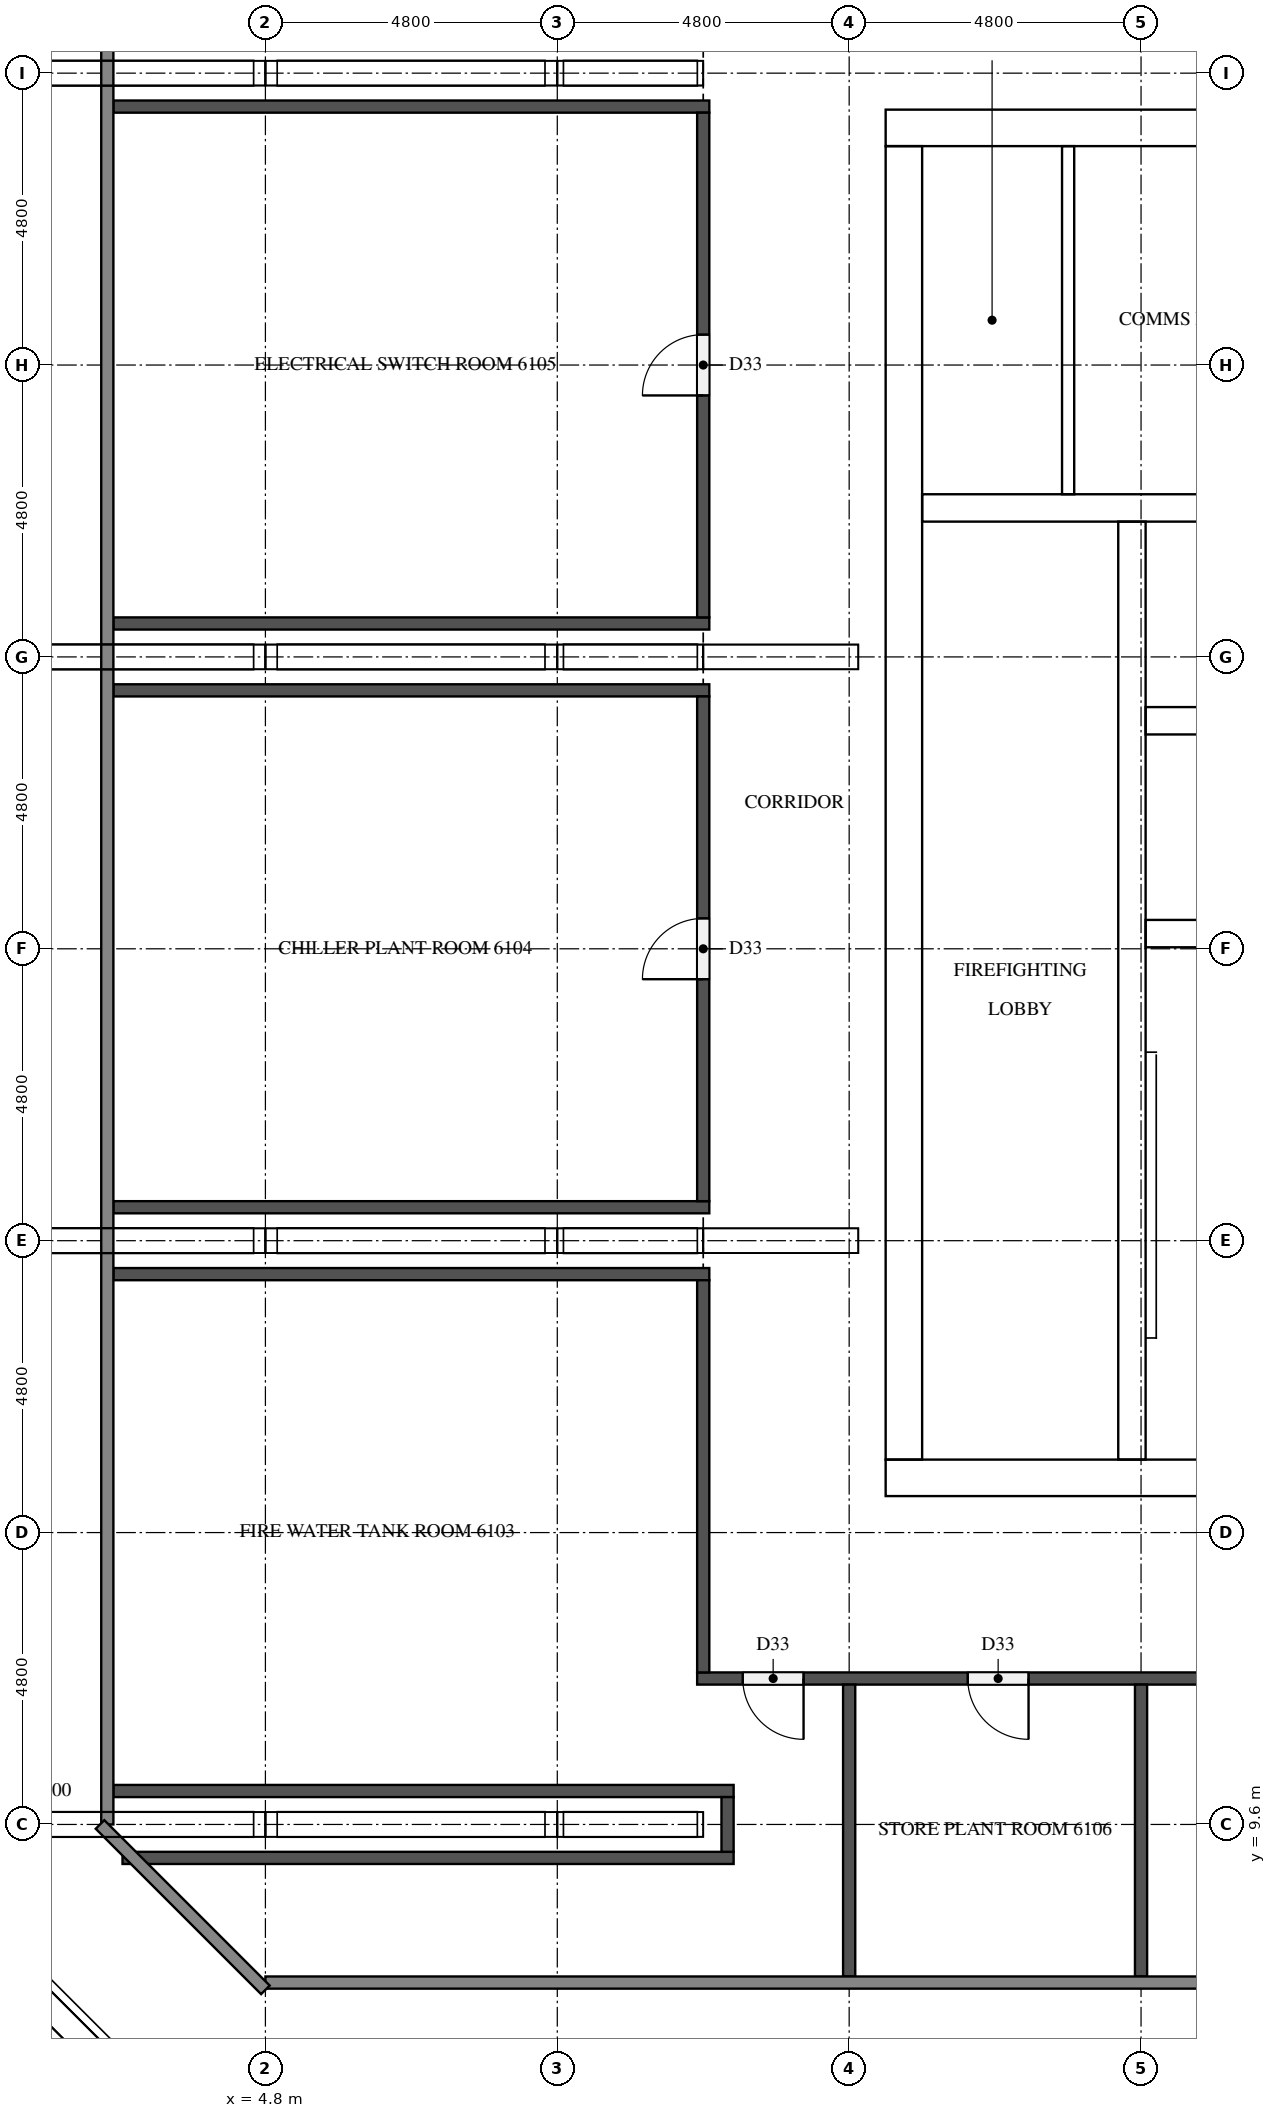
"""IFC4 building model, lengths in metres.
Left out: names, types, materials, properties, quantities, classifications, styles, units other than length and angle.
Written with IfcOpenShell. Run it as: python <this file> out.ifc"""

import sys

from ifc_helpers import new_model, si_unit, direction, frame, frame_2d, origin, place, context, subcontext, project, spatial, rectangle, extrude, element, fill, save


model = new_model("IFC4")
c1 = context("Model", 3, precision=1e-05, world=origin(), true_north=direction((0.0, 1.0)))
c2 = subcontext(c1, "Body", "Model", "MODEL_VIEW")
j1 = project(units=[si_unit("LENGTHUNIT", "METRE"), si_unit("PLANEANGLEUNIT", "RADIAN")], contexts=[c1])
p1 = place(None, origin())
s1 = spatial("IfcSite", under=j1, at=p1, CompositionType="ELEMENT")
p2 = place(p1, origin())
s2 = spatial("IfcBuilding", under=s1, at=p2, CompositionType="ELEMENT")
p3 = place(p2, frame((0.0, 0.0, 233.3)))
s3 = spatial("IfcBuildingStorey", under=s2, at=p3, CompositionType="ELEMENT", Elevation=233.3)
p4 = place(p3, frame((15.0, 15.3, 0.0), z_axis=(0.0, 0.0, 1.0), x_axis=(1.0, 0.0, 0.0)))
e1 = element("IfcWall", 1, at=p4, inside=s3, PredefinedType="SHEAR", context=c2, shape_type="SweptSolid", body=[
    extrude(rectangle(XDim=32.4, YDim=0.6, at=frame_2d((16.2, 0.0))), origin(), (0.0, 0.0, 1.0), 5.1),
])
p5 = place(p4, frame((15.3, 0.0, 0.0)))
e2 = element("IfcOpeningElement", 2, at=p5, cuts=e1, PredefinedType="OPENING", context=c2, shape_type="SweptSolid", body=[
    extrude(rectangle(XDim=1.8, YDim=2.1, at=frame_2d((0.9, 1.05))), frame((0.0, 0.31, 0.0), z_axis=(0.0, -1.0, 0.0), x_axis=(1.0, 0.0, 0.0)), (0.0, 0.0, 1.0), 0.62),
])
p6 = place(p3, frame((15.0, 37.5, 0.0), z_axis=(0.0, 0.0, 1.0), x_axis=(1.0, 0.0, 0.0)))
e3 = element("IfcWall", 3, at=p6, inside=s3, PredefinedType="SHEAR", context=c2, shape_type="SweptSolid", body=[
    extrude(rectangle(XDim=32.4, YDim=0.6, at=frame_2d((16.2, 0.0))), origin(), (0.0, 0.0, 1.0), 5.1),
])
p7 = place(p6, frame((15.3, 0.0, 0.0)))
e4 = element("IfcOpeningElement", 4, at=p7, cuts=e3, PredefinedType="OPENING", context=c2, shape_type="SweptSolid", body=[
    extrude(rectangle(XDim=1.8, YDim=2.1, at=frame_2d((0.9, 1.05))), frame((0.0, 0.31, 0.0), z_axis=(0.0, -1.0, 0.0), x_axis=(1.0, 0.0, 0.0)), (0.0, 0.0, 1.0), 0.62),
])
p8 = place(p6, frame((1.25, 0.0, 0.0)))
e5 = element("IfcOpeningElement", 5, at=p8, cuts=e3, PredefinedType="OPENING", context=c2, shape_type="SweptSolid", body=[
    extrude(rectangle(XDim=1.0, YDim=2.1, at=frame_2d((0.5, 1.05))), frame((0.0, 0.31, 0.0), z_axis=(0.0, -1.0, 0.0), x_axis=(1.0, 0.0, 0.0)), (0.0, 0.0, 1.0), 0.62),
])
p9 = place(p6, frame((4.988, 0.0, 0.0)))
e6 = element("IfcOpeningElement", 6, at=p9, cuts=e3, PredefinedType="OPENING", context=c2, shape_type="SweptSolid", body=[
    extrude(rectangle(XDim=1.0, YDim=2.1, at=frame_2d((0.5, 1.05))), frame((0.0, 0.31, 0.0), z_axis=(0.0, -1.0, 0.0), x_axis=(1.0, 0.0, 0.0)), (0.0, 0.0, 1.0), 0.62),
])
p10 = place(p3, frame((15.3, 15.6, 0.0), z_axis=(0.0, 0.0, 1.0), x_axis=(0.0, 1.0, 0.0)))
e7 = element("IfcWall", 7, at=p10, inside=s3, PredefinedType="SHEAR", context=c2, shape_type="SweptSolid", body=[
    extrude(rectangle(XDim=21.6, YDim=0.6, at=frame_2d((10.8, 0.0))), origin(), (0.0, 0.0, 1.0), 5.1),
])
p11 = place(p10, frame((5.16, 0.0, 0.0)))
e8 = element("IfcOpeningElement", 8, at=p11, cuts=e7, PredefinedType="OPENING", context=c2, shape_type="SweptSolid", body=[
    extrude(rectangle(XDim=1.2, YDim=2.1, at=frame_2d((0.6, 1.05))), frame((0.0, 0.31, 0.0), z_axis=(0.0, -1.0, 0.0), x_axis=(1.0, 0.0, 0.0)), (0.0, 0.0, 1.0), 0.62),
])
p12 = place(p3, frame((19.05, 15.6, 0.0), z_axis=(0.0, 0.0, 1.0), x_axis=(0.0, 1.0, 0.0)))
e9 = element("IfcWall", 9, at=p12, inside=s3, PredefinedType="SHEAR", context=c2, shape_type="SweptSolid", body=[
    extrude(rectangle(XDim=15.425, YDim=0.45, at=frame_2d((7.712, 0.0))), origin(), (0.0, 0.0, 1.0), 5.1),
])
p13 = place(p12, frame((9.85, 0.0, 0.0)))
e10 = element("IfcOpeningElement", 10, at=p13, cuts=e9, PredefinedType="OPENING", context=c2, shape_type="SweptSolid", body=[
    extrude(rectangle(XDim=1.1, YDim=2.1, at=frame_2d((0.55, 1.05))), frame((0.0, 0.235, 0.0), z_axis=(0.0, -1.0, 0.0), x_axis=(1.0, 0.0, 0.0)), (0.0, 0.0, 1.0), 0.47),
])
p14 = place(p12, frame((13.35, 0.0, 0.0)))
e11 = element("IfcOpeningElement", 11, at=p14, cuts=e9, PredefinedType="OPENING", context=c2, shape_type="SweptSolid", body=[
    extrude(rectangle(XDim=1.1, YDim=2.1, at=frame_2d((0.55, 1.05))), frame((0.0, 0.235, 0.0), z_axis=(0.0, -1.0, 0.0), x_axis=(1.0, 0.0, 0.0)), (0.0, 0.0, 1.0), 0.47),
])
p15 = place(p12, frame((0.6, 0.0, 0.0)))
e12 = element("IfcOpeningElement", 12, at=p15, cuts=e9, PredefinedType="OPENING", context=c2, shape_type="SweptSolid", body=[
    extrude(rectangle(XDim=1.2, YDim=2.1, at=frame_2d((0.6, 1.05))), frame((0.0, 0.235, 0.0), z_axis=(0.0, -1.0, 0.0), x_axis=(1.0, 0.0, 0.0)), (0.0, 0.0, 1.0), 0.47),
])
for number, where, z_axis, x_axis in (
    (13, (19.275, 24.25, 0.0), (0.0, 0.0, 1.0), (1.0, 0.0, 0.0)),
    (14, (19.275, 27.75, 0.0), (0.0, 0.0, 1.0), (1.0, 0.0, 0.0)),
):
    element("IfcWall", number, at=place(p3, frame(where, z_axis=z_axis, x_axis=x_axis)), inside=s3, PredefinedType="SHEAR", context=c2, shape_type="SweptSolid", body=[
        extrude(rectangle(XDim=3.6, YDim=0.45, at=frame_2d((1.8, 0.0))), origin(), (0.0, 0.0, 1.0), 5.1),
    ])
p16 = place(p3, frame((15.6, 31.25, 0.0), z_axis=(0.0, 0.0, 1.0), x_axis=(1.0, 0.0, 0.0)))
e15 = element("IfcWall", 15, at=p16, inside=s3, PredefinedType="SHEAR", context=c2, shape_type="SweptSolid", body=[
    extrude(rectangle(XDim=7.275, YDim=0.45, at=frame_2d((3.637, 0.0))), origin(), (0.0, 0.0, 1.0), 5.1),
])
p17 = place(p3, frame((18.001, 31.475, 0.0), z_axis=(0.0, 0.0, 1.0), x_axis=(0.0, 1.0, 0.0)))
e16 = element("IfcWall", 16, at=p17, inside=s3, PredefinedType="PARTITIONING", context=c2, shape_type="SweptSolid", body=[
    extrude(rectangle(XDim=5.725, YDim=0.2, at=frame_2d((2.862, 0.0))), origin(), (0.0, 0.0, 1.0), 5.1),
])
p18 = place(p3, frame((2.45, 9.05, 0.0), z_axis=(0.0, 0.0, 1.0), x_axis=(1.0, 0.0, 0.0)))
e17 = element("IfcWall", 17, at=p18, inside=s3, PredefinedType="PARTITIONING", context=c2, shape_type="SweptSolid", body=[
    extrude(rectangle(XDim=10.05, YDim=0.2, at=frame_2d((5.025, 0.0))), origin(), (0.0, 0.0, 1.0), 5.1),
])
p19 = place(p3, frame((2.3, 10.15, 0.0), z_axis=(0.0, 0.0, 1.0), x_axis=(1.0, 0.0, 0.0)))
e18 = element("IfcWall", 18, at=p19, inside=s3, PredefinedType="PARTITIONING", context=c2, shape_type="SweptSolid", body=[
    extrude(rectangle(XDim=10.2, YDim=0.2, at=frame_2d((5.1, 0.0))), origin(), (0.0, 0.0, 1.0), 5.1),
])
p20 = place(p3, frame((38.4, 12.0, 0.0), z_axis=(0.0, 0.0, 1.0), x_axis=(-1.0, 0.0, 0.0)))
e19 = element("IfcWall", 19, at=p20, inside=s3, PredefinedType="PARTITIONING", context=c2, shape_type="SweptSolid", body=[
    extrude(rectangle(XDim=26.5, YDim=0.2, at=frame_2d((13.25, 0.0))), origin(), (0.0, 0.0, 1.0), 5.1),
])
p21 = place(p20, frame((24.75, 0.0, 0.0)))
e20 = element("IfcOpeningElement", 20, at=p21, cuts=e19, PredefinedType="OPENING", context=c2, shape_type="SweptSolid", body=[
    extrude(rectangle(XDim=1.0, YDim=2.1, at=frame_2d((0.5, 1.05))), frame((0.0, 0.11, 0.0), z_axis=(0.0, -1.0, 0.0), x_axis=(1.0, 0.0, 0.0)), (0.0, 0.0, 1.0), 0.22),
])
p22 = place(p20, frame((21.05, 0.0, 0.0)))
e21 = element("IfcOpeningElement", 21, at=p22, cuts=e19, PredefinedType="OPENING", context=c2, shape_type="SweptSolid", body=[
    extrude(rectangle(XDim=1.0, YDim=2.1, at=frame_2d((0.5, 1.05))), frame((0.0, 0.11, 0.0), z_axis=(0.0, -1.0, 0.0), x_axis=(1.0, 0.0, 0.0)), (0.0, 0.0, 1.0), 0.22),
])
p23 = place(p20, frame((13.95, 0.0, 0.0)))
e22 = element("IfcOpeningElement", 22, at=p23, cuts=e19, PredefinedType="OPENING", context=c2, shape_type="SweptSolid", body=[
    extrude(rectangle(XDim=1.0, YDim=2.1, at=frame_2d((0.5, 1.05))), frame((0.0, 0.11, 0.0), z_axis=(0.0, -1.0, 0.0), x_axis=(1.0, 0.0, 0.0)), (0.0, 0.0, 1.0), 0.22),
])
p24 = place(p20, frame((4.25, 0.0, 0.0)))
e23 = element("IfcOpeningElement", 23, at=p24, cuts=e19, PredefinedType="OPENING", context=c2, shape_type="SweptSolid", body=[
    extrude(rectangle(XDim=1.0, YDim=2.1, at=frame_2d((0.5, 1.05))), frame((0.0, 0.11, 0.0), z_axis=(0.0, -1.0, 0.0), x_axis=(1.0, 0.0, 0.0)), (0.0, 0.0, 1.0), 0.22),
])
for number, where, z_axis, x_axis in (
    (24, (2.3, 18.65, 0.0), (0.0, 0.0, 1.0), (1.0, 0.0, 0.0)),
    (25, (2.3, 19.75, 0.0), (0.0, 0.0, 1.0), (1.0, 0.0, 0.0)),
    (26, (2.3, 28.25, 0.0), (0.0, 0.0, 1.0), (1.0, 0.0, 0.0)),
    (27, (2.3, 29.35, 0.0), (0.0, 0.0, 1.0), (1.0, 0.0, 0.0)),
    (28, (2.3, 37.85, 0.0), (0.0, 0.0, 1.0), (1.0, 0.0, 0.0)),
):
    element("IfcWall", number, at=place(p3, frame(where, z_axis=z_axis, x_axis=x_axis)), inside=s3, PredefinedType="PARTITIONING", context=c2, shape_type="SweptSolid", body=[
        extrude(rectangle(XDim=9.8, YDim=0.2, at=frame_2d((4.9, 0.0))), origin(), (0.0, 0.0, 1.0), 5.1),
    ])
p25 = place(p3, frame((12.0, 12.1, 0.0), z_axis=(0.0, 0.0, 1.0), x_axis=(0.0, 1.0, 0.0)))
e29 = element("IfcWall", 29, at=p25, inside=s3, PredefinedType="PARTITIONING", context=c2, shape_type="SweptSolid", body=[
    extrude(rectangle(XDim=6.45, YDim=0.2, at=frame_2d((3.225, 0.0))), origin(), (0.0, 0.0, 1.0), 5.1),
])
p26 = place(p3, frame((12.0, 19.85, 0.0), z_axis=(0.0, 0.0, 1.0), x_axis=(0.0, 1.0, 0.0)))
e30 = element("IfcWall", 30, at=p26, inside=s3, PredefinedType="PARTITIONING", context=c2, shape_type="SweptSolid", body=[
    extrude(rectangle(XDim=8.3, YDim=0.2, at=frame_2d((4.15, 0.0))), origin(), (0.0, 0.0, 1.0), 5.1),
])
p27 = place(p26, frame((3.65, 0.0, 0.0)))
e31 = element("IfcOpeningElement", 31, at=p27, cuts=e30, PredefinedType="OPENING", context=c2, shape_type="SweptSolid", body=[
    extrude(rectangle(XDim=1.0, YDim=2.1, at=frame_2d((0.5, 1.05))), frame((0.0, 0.11, 0.0), z_axis=(0.0, -1.0, 0.0), x_axis=(1.0, 0.0, 0.0)), (0.0, 0.0, 1.0), 0.22),
])
p28 = place(p3, frame((12.0, 29.45, 0.0), z_axis=(0.0, 0.0, 1.0), x_axis=(0.0, 1.0, 0.0)))
e32 = element("IfcWall", 32, at=p28, inside=s3, PredefinedType="PARTITIONING", context=c2, shape_type="SweptSolid", body=[
    extrude(rectangle(XDim=8.3, YDim=0.2, at=frame_2d((4.15, 0.0))), origin(), (0.0, 0.0, 1.0), 5.1),
])
p29 = place(p28, frame((3.65, 0.0, 0.0)))
e33 = element("IfcOpeningElement", 33, at=p29, cuts=e32, PredefinedType="OPENING", context=c2, shape_type="SweptSolid", body=[
    extrude(rectangle(XDim=1.0, YDim=2.1, at=frame_2d((0.5, 1.05))), frame((0.0, 0.11, 0.0), z_axis=(0.0, -1.0, 0.0), x_axis=(1.0, 0.0, 0.0)), (0.0, 0.0, 1.0), 0.22),
])
p30 = place(p3, frame((12.4, 9.15, 0.0), z_axis=(0.0, 0.0, 1.0), x_axis=(0.0, 1.0, 0.0)))
e34 = element("IfcWall", 34, at=p30, inside=s3, PredefinedType="PARTITIONING", context=c2, shape_type="SweptSolid", body=[
    extrude(rectangle(XDim=0.9, YDim=0.2, at=frame_2d((0.45, 0.0))), origin(), (0.0, 0.0, 1.0), 5.1),
])
for number, where, z_axis, x_axis in (
    (35, (14.4, 7.1, 0.0), (0.0, 0.0, 1.0), (0.0, 1.0, 0.0)),
    (36, (19.2, 7.1, 0.0), (0.0, 0.0, 1.0), (0.0, 1.0, 0.0)),
):
    element("IfcWall", number, at=place(p3, frame(where, z_axis=z_axis, x_axis=x_axis)), inside=s3, PredefinedType="PARTITIONING", context=c2, shape_type="SweptSolid", body=[
        extrude(rectangle(XDim=4.8, YDim=0.2, at=frame_2d((2.4, 0.0))), origin(), (0.0, 0.0, 1.0), 5.1),
    ])
p31 = place(p13, origin())
e37 = element("IfcDoor", 37, at=p31, inside=s3, OperationType="DOUBLE_DOOR_SLIDING", PredefinedType="DOOR", context=c2, shape_type="SweptSolid", body=[
    extrude(rectangle(XDim=1.1, YDim=2.1, at=frame_2d((0.55, 1.05))), frame((0.0, 0.025, 0.0), z_axis=(0.0, -1.0, 0.0), x_axis=(1.0, 0.0, 0.0)), (0.0, 0.0, 1.0), 0.05),
])
fill(e10, e37)
p32 = place(p14, origin())
e38 = element("IfcDoor", 38, at=p32, inside=s3, OperationType="DOUBLE_DOOR_SLIDING", PredefinedType="DOOR", context=c2, shape_type="SweptSolid", body=[
    extrude(rectangle(XDim=1.1, YDim=2.1, at=frame_2d((0.55, 1.05))), frame((0.0, 0.025, 0.0), z_axis=(0.0, -1.0, 0.0), x_axis=(1.0, 0.0, 0.0)), (0.0, 0.0, 1.0), 0.05),
])
fill(e11, e38)
p33 = place(p15, frame((1.2, 0.0, 0.0), z_axis=(0.0, 0.0, 1.0), x_axis=(-1.0, 0.0, 0.0)))
e39 = element("IfcDoor", 39, at=p33, inside=s3, OperationType="SINGLE_SWING_LEFT", PredefinedType="DOOR", context=c2, shape_type="SweptSolid", body=[
    extrude(rectangle(XDim=1.2, YDim=2.1, at=frame_2d((0.6, 1.05))), frame((0.0, 0.025, 0.0), z_axis=(0.0, -1.0, 0.0), x_axis=(1.0, 0.0, 0.0)), (0.0, 0.0, 1.0), 0.05),
])
fill(e12, e39)
p34 = place(p11, frame((1.2, 0.0, 0.0), z_axis=(0.0, 0.0, 1.0), x_axis=(-1.0, 0.0, 0.0)))
e40 = element("IfcDoor", 40, at=p34, inside=s3, OperationType="SINGLE_SWING_RIGHT", PredefinedType="DOOR", context=c2, shape_type="SweptSolid", body=[
    extrude(rectangle(XDim=1.2, YDim=2.1, at=frame_2d((0.6, 1.05))), frame((0.0, 0.025, 0.0), z_axis=(0.0, -1.0, 0.0), x_axis=(1.0, 0.0, 0.0)), (0.0, 0.0, 1.0), 0.05),
])
fill(e8, e40)
p35 = place(p8, origin())
e41 = element("IfcDoor", 41, at=p35, inside=s3, OperationType="SINGLE_SWING_RIGHT", PredefinedType="DOOR", context=c2, shape_type="SweptSolid", body=[
    extrude(rectangle(XDim=1.0, YDim=2.1, at=frame_2d((0.5, 1.05))), frame((0.0, 0.025, 0.0), z_axis=(0.0, -1.0, 0.0), x_axis=(1.0, 0.0, 0.0)), (0.0, 0.0, 1.0), 0.05),
])
fill(e5, e41)
p36 = place(p9, origin())
e42 = element("IfcDoor", 42, at=p36, inside=s3, OperationType="SINGLE_SWING_LEFT", PredefinedType="DOOR", context=c2, shape_type="SweptSolid", body=[
    extrude(rectangle(XDim=1.0, YDim=2.1, at=frame_2d((0.5, 1.05))), frame((0.0, 0.025, 0.0), z_axis=(0.0, -1.0, 0.0), x_axis=(1.0, 0.0, 0.0)), (0.0, 0.0, 1.0), 0.05),
])
fill(e6, e42)
p37 = place(p21, origin())
e43 = element("IfcDoor", 43, at=p37, inside=s3, OperationType="SINGLE_SWING_LEFT", PredefinedType="DOOR", context=c2, shape_type="SweptSolid", body=[
    extrude(rectangle(XDim=1.0, YDim=2.1, at=frame_2d((0.5, 1.05))), frame((0.0, 0.025, 0.0), z_axis=(0.0, -1.0, 0.0), x_axis=(1.0, 0.0, 0.0)), (0.0, 0.0, 1.0), 0.05),
])
fill(e20, e43)
p38 = place(p27, origin())
e44 = element("IfcDoor", 44, at=p38, inside=s3, OperationType="SINGLE_SWING_LEFT", PredefinedType="DOOR", context=c2, shape_type="SweptSolid", body=[
    extrude(rectangle(XDim=1.0, YDim=2.1, at=frame_2d((0.5, 1.05))), frame((0.0, 0.025, 0.0), z_axis=(0.0, -1.0, 0.0), x_axis=(1.0, 0.0, 0.0)), (0.0, 0.0, 1.0), 0.05),
])
fill(e31, e44)
p39 = place(p29, origin())
e45 = element("IfcDoor", 45, at=p39, inside=s3, OperationType="SINGLE_SWING_LEFT", PredefinedType="DOOR", context=c2, shape_type="SweptSolid", body=[
    extrude(rectangle(XDim=1.0, YDim=2.1, at=frame_2d((0.5, 1.05))), frame((0.0, 0.025, 0.0), z_axis=(0.0, -1.0, 0.0), x_axis=(1.0, 0.0, 0.0)), (0.0, 0.0, 1.0), 0.05),
])
fill(e33, e45)
p40 = place(p22, origin())
e46 = element("IfcDoor", 46, at=p40, inside=s3, OperationType="SINGLE_SWING_LEFT", PredefinedType="DOOR", context=c2, shape_type="SweptSolid", body=[
    extrude(rectangle(XDim=1.0, YDim=2.1, at=frame_2d((0.5, 1.05))), frame((0.0, 0.025, 0.0), z_axis=(0.0, -1.0, 0.0), x_axis=(1.0, 0.0, 0.0)), (0.0, 0.0, 1.0), 0.05),
])
fill(e21, e46)
save(model, sys.argv[1])
